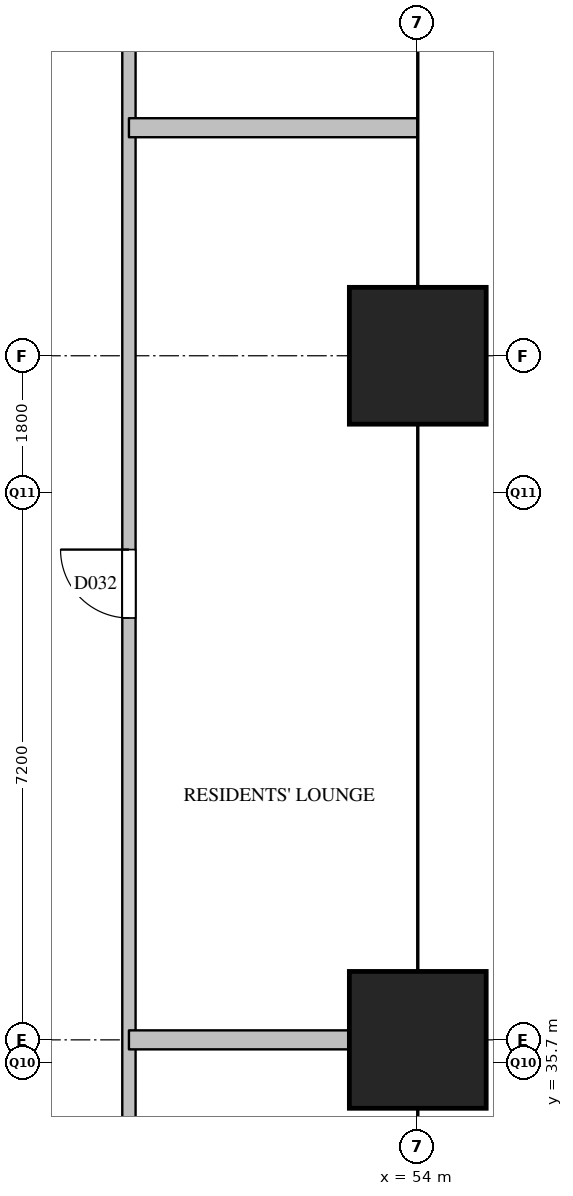
"""IFC4 building model, lengths in metres.
Left out: names, types, materials, properties, quantities, classifications, styles, units other than length and angle.
Written with IfcOpenShell. Run it as: python <this file> out.ifc"""

import sys

from ifc_helpers import new_model, si_unit, direction, frame, frame_2d, origin, origin_2d, place, context, subcontext, project, spatial, rectangle, extrude, element, fill, save


model = new_model("IFC4")
c1 = context("Model", 3, precision=1e-05, world=origin(), true_north=direction((0.0, 1.0)))
c2 = subcontext(c1, "Body", "Model", "MODEL_VIEW")
j1 = project(units=[si_unit("LENGTHUNIT", "METRE"), si_unit("PLANEANGLEUNIT", "RADIAN")], contexts=[c1])
p1 = place(None, origin())
s1 = spatial("IfcSite", under=j1, at=p1, CompositionType="ELEMENT")
p2 = place(p1, origin())
s2 = spatial("IfcBuilding", under=s1, at=p2, CompositionType="ELEMENT")
p3 = place(p2, frame((0.0, 0.0, 81.6)))
s3 = spatial("IfcBuildingStorey", under=s2, at=p3, CompositionType="ELEMENT", Elevation=81.6)
for number, where, z_axis, x_axis in (
    (1, (54.0, 36.0, 0.0), (0.0, 0.0, 1.0), (1.0, 0.0, 0.0)),
    (2, (54.0, 45.0, 0.0), (0.0, 0.0, 1.0), (1.0, 0.0, 0.0)),
):
    element("IfcColumn", number, at=place(p3, frame(where, z_axis=z_axis, x_axis=x_axis)), inside=s3, PredefinedType="COLUMN", context=c2, shape_type="SweptSolid", body=[
        extrude(rectangle(XDim=1.8, YDim=1.8, at=origin_2d()), origin(), (0.0, 0.0, 1.0), 3.8),
    ])
p4 = place(p3, frame((50.2, 26.7, 0.0), z_axis=(0.0, 0.0, 1.0), x_axis=(0.0, 1.0, 0.0)))
e3 = element("IfcWall", 3, at=p4, inside=s3, PredefinedType="PARTITIONING", context=c2, shape_type="SweptSolid", body=[
    extrude(rectangle(XDim=25.1, YDim=0.175, at=frame_2d((12.55, 0.0))), origin(), (0.0, 0.0, 1.0), 2.5),
])
p5 = place(p4, frame((4.2, 0.0, 0.0)))
e4 = element("IfcOpeningElement", 4, at=p5, cuts=e3, PredefinedType="OPENING", context=c2, shape_type="SweptSolid", body=[
    extrude(rectangle(XDim=0.9, YDim=2.1, at=frame_2d((0.45, 1.05))), frame((0.0, 0.097, 0.0), z_axis=(0.0, -1.0, 0.0), x_axis=(1.0, 0.0, 0.0)), (0.0, 0.0, 1.0), 0.195),
])
p6 = place(p4, frame((14.85, 0.0, 0.0)))
e5 = element("IfcOpeningElement", 5, at=p6, cuts=e3, PredefinedType="OPENING", context=c2, shape_type="SweptSolid", body=[
    extrude(rectangle(XDim=0.9, YDim=2.1, at=frame_2d((0.45, 1.05))), frame((0.0, 0.097, 0.0), z_axis=(0.0, -1.0, 0.0), x_axis=(1.0, 0.0, 0.0)), (0.0, 0.0, 1.0), 0.195),
])
p7 = place(p3, frame((50.2, 36.0, 0.0), z_axis=(0.0, 0.0, 1.0), x_axis=(1.0, 0.0, 0.0)))
e6 = element("IfcWall", 6, at=p7, inside=s3, PredefinedType="PARTITIONING", context=c2, shape_type="SweptSolid", body=[
    extrude(rectangle(XDim=3.8, YDim=0.25, at=frame_2d((1.9, 0.0))), origin(), (0.0, 0.0, 1.0), 3.5),
])
p8 = place(p3, frame((50.2, 48.0, 0.0), z_axis=(0.0, 0.0, 1.0), x_axis=(1.0, 0.0, 0.0)))
e7 = element("IfcWall", 7, at=p8, inside=s3, PredefinedType="PARTITIONING", context=c2, shape_type="SweptSolid", body=[
    extrude(rectangle(XDim=3.8, YDim=0.25, at=frame_2d((1.9, 0.0))), origin(), (0.0, 0.0, 1.0), 2.5),
])
p9 = place(p6, origin())
e8 = element("IfcDoor", 8, at=p9, inside=s3, OperationType="SINGLE_SWING_RIGHT", PredefinedType="DOOR", context=c2, shape_type="SweptSolid", body=[
    extrude(rectangle(XDim=0.9, YDim=2.1, at=frame_2d((0.45, 1.05))), frame((0.0, 0.025, 0.0), z_axis=(0.0, -1.0, 0.0), x_axis=(1.0, 0.0, 0.0)), (0.0, 0.0, 1.0), 0.05),
])
fill(e5, e8)
save(model, sys.argv[1])
